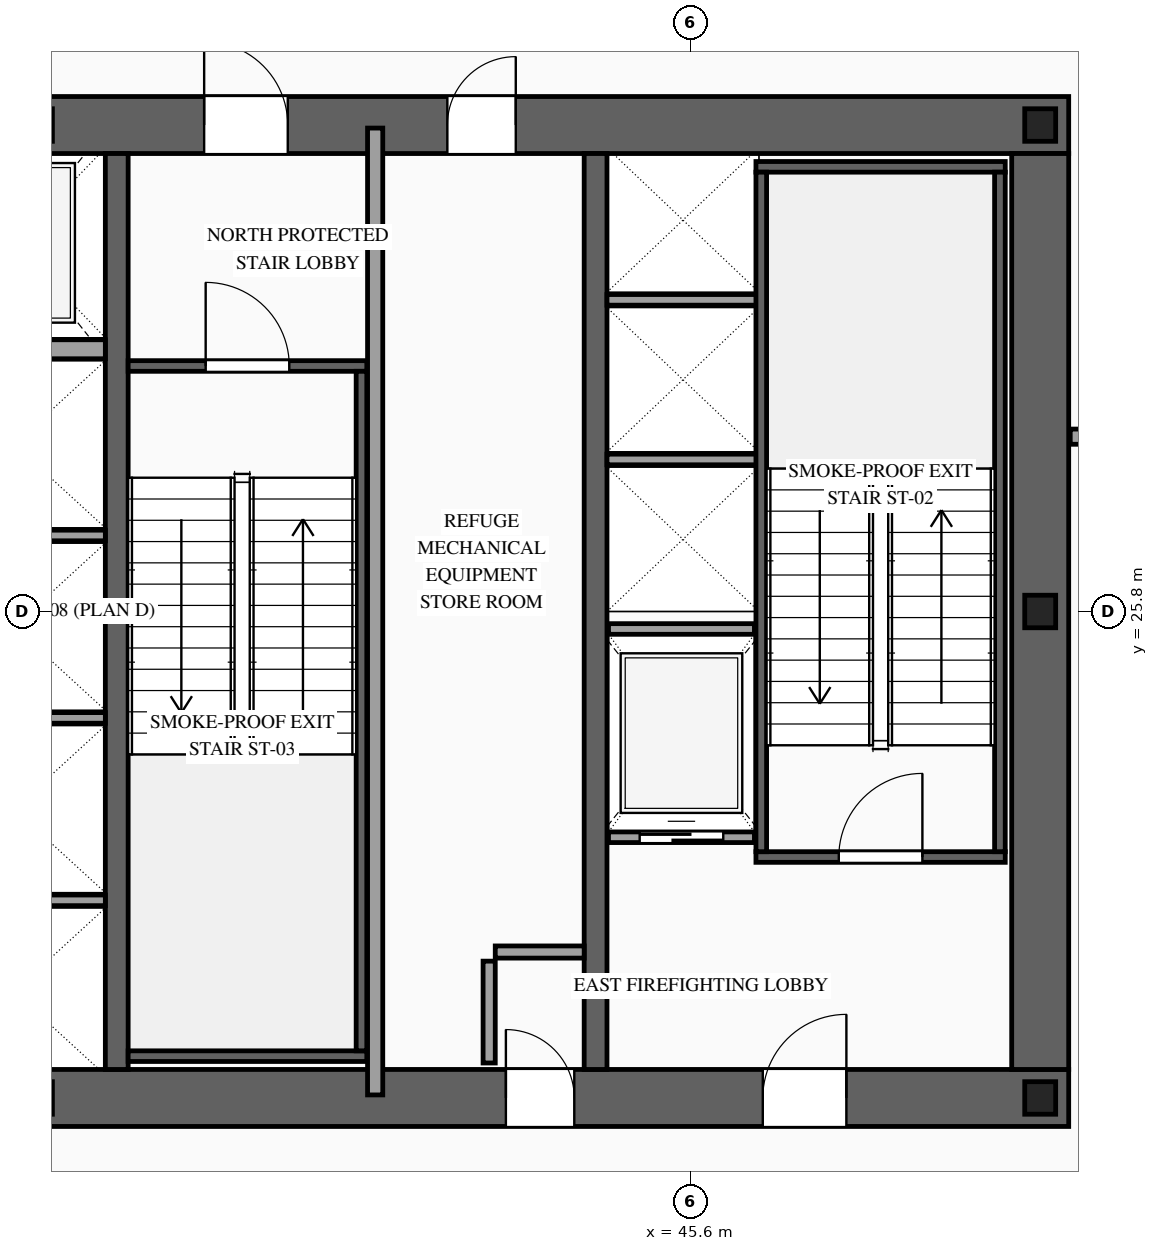
"""IFC4 building model, lengths in metres.
Left out: names, types, materials, properties, quantities, classifications, styles, units other than length and angle.
Written with IfcOpenShell. Run it as: python <this file> out.ifc"""

import sys

from ifc_helpers import new_model, si_unit, direction, frame, frame_2d, origin, origin_2d, place, context, subcontext, project, spatial, rectangle, i_section, extrude, source, transform, mapped, element, fill, save


model = new_model("IFC4")
c1 = context("Model", 3, precision=1e-05, world=origin(), true_north=direction((0.0, 1.0)))
c2 = subcontext(c1, "Body", "Model", "MODEL_VIEW")
j1 = project(units=[si_unit("LENGTHUNIT", "METRE"), si_unit("PLANEANGLEUNIT", "RADIAN")], contexts=[c1])
p1 = place(None, origin())
s1 = spatial("IfcSite", under=j1, at=p1, CompositionType="ELEMENT")
p2 = place(p1, origin())
s2 = spatial("IfcBuilding", under=s1, at=p2, CompositionType="ELEMENT")
p3 = place(p2, frame((0.0, 0.0, 129.8)))
s3 = spatial("IfcBuildingStorey", under=s2, at=p3, CompositionType="ELEMENT", Elevation=129.8)
p4 = place(p3, frame((23.425, 19.4, 0.0), z_axis=(0.0, 0.0, 1.0), x_axis=(1.0, 0.0, 0.0)))
e1 = element("IfcWall", 1, at=p4, inside=s3, PredefinedType="SHEAR", context=c2, shape_type="SweptSolid", body=[
    extrude(rectangle(XDim=27.15, YDim=0.75, at=frame_2d((13.575, 0.0))), origin(), (0.0, 0.0, 1.0), 4.6),
])
p5 = place(p4, frame((2.025, 0.0, 0.0)))
e2 = element("IfcOpeningElement", 2, at=p5, cuts=e1, PredefinedType="OPENING", context=c2, shape_type="SweptSolid", body=[
    extrude(rectangle(XDim=1.1, YDim=2.2, at=frame_2d((0.55, 1.1))), frame((0.0, 0.39, 0.0), z_axis=(0.0, -1.0, 0.0), x_axis=(1.0, 0.0, 0.0)), (0.0, 0.0, 1.0), 0.78),
])
p6 = place(p4, frame((9.925, 0.0, 0.0)))
e3 = element("IfcOpeningElement", 3, at=p6, cuts=e1, PredefinedType="OPENING", context=c2, shape_type="SweptSolid", body=[
    extrude(rectangle(XDim=1.1, YDim=2.2, at=frame_2d((0.55, 1.1))), frame((0.0, 0.39, 0.0), z_axis=(0.0, -1.0, 0.0), x_axis=(1.0, 0.0, 0.0)), (0.0, 0.0, 1.0), 0.78),
])
p7 = place(p4, frame((23.125, 0.0, 0.0)))
e4 = element("IfcOpeningElement", 4, at=p7, cuts=e1, PredefinedType="OPENING", context=c2, shape_type="SweptSolid", body=[
    extrude(rectangle(XDim=1.1, YDim=2.2, at=frame_2d((0.55, 1.1))), frame((0.0, 0.39, 0.0), z_axis=(0.0, -1.0, 0.0), x_axis=(1.0, 0.0, 0.0)), (0.0, 0.0, 1.0), 0.78),
])
p8 = place(p4, frame((19.745, 0.0, 0.0)))
e5 = element("IfcOpeningElement", 5, at=p8, cuts=e1, PredefinedType="OPENING", context=c2, shape_type="SweptSolid", body=[
    extrude(rectangle(XDim=0.9, YDim=2.15, at=frame_2d((0.45, 1.075))), frame((0.0, 0.39, 0.0), z_axis=(0.0, -1.0, 0.0), x_axis=(1.0, 0.0, 0.0)), (0.0, 0.0, 1.0), 0.78),
])
p9 = place(p3, frame((23.425, 32.2, 0.0), z_axis=(0.0, 0.0, 1.0), x_axis=(1.0, 0.0, 0.0)))
e6 = element("IfcWall", 6, at=p9, inside=s3, PredefinedType="SHEAR", context=c2, shape_type="SweptSolid", body=[
    extrude(rectangle(XDim=27.15, YDim=0.75, at=frame_2d((13.575, 0.0))), origin(), (0.0, 0.0, 1.0), 4.6),
])
p10 = place(p9, frame((4.645, 0.0, 0.0)))
e7 = element("IfcOpeningElement", 7, at=p10, cuts=e6, PredefinedType="OPENING", context=c2, shape_type="SweptSolid", body=[
    extrude(rectangle(XDim=0.9, YDim=2.15, at=frame_2d((0.45, 1.075))), frame((0.0, 0.39, 0.0), z_axis=(0.0, -1.0, 0.0), x_axis=(1.0, 0.0, 0.0)), (0.0, 0.0, 1.0), 0.78),
])
p11 = place(p9, frame((9.925, 0.0, 0.0)))
e8 = element("IfcOpeningElement", 8, at=p11, cuts=e6, PredefinedType="OPENING", context=c2, shape_type="SweptSolid", body=[
    extrude(rectangle(XDim=1.1, YDim=2.2, at=frame_2d((0.55, 1.1))), frame((0.0, 0.39, 0.0), z_axis=(0.0, -1.0, 0.0), x_axis=(1.0, 0.0, 0.0)), (0.0, 0.0, 1.0), 0.78),
])
p12 = place(p9, frame((15.775, 0.0, 0.0)))
e9 = element("IfcOpeningElement", 9, at=p12, cuts=e6, PredefinedType="OPENING", context=c2, shape_type="SweptSolid", body=[
    extrude(rectangle(XDim=1.1, YDim=2.2, at=frame_2d((0.55, 1.1))), frame((0.0, 0.39, 0.0), z_axis=(0.0, -1.0, 0.0), x_axis=(1.0, 0.0, 0.0)), (0.0, 0.0, 1.0), 0.78),
])
p13 = place(p9, frame((18.975, 0.0, 0.0)))
e10 = element("IfcOpeningElement", 10, at=p13, cuts=e6, PredefinedType="OPENING", context=c2, shape_type="SweptSolid", body=[
    extrude(rectangle(XDim=0.9, YDim=2.15, at=frame_2d((0.45, 1.075))), frame((0.0, 0.39, 0.0), z_axis=(0.0, -1.0, 0.0), x_axis=(1.0, 0.0, 0.0)), (0.0, 0.0, 1.0), 0.78),
])
m1 = source(origin(), c2, "Body", "SweptSolid", [
    extrude(rectangle(XDim=12.05, YDim=0.75, at=frame_2d((6.025, 0.0))), origin(), (0.0, 0.0, 1.0), 4.6),
])
p14 = place(p3, frame((50.2, 19.775, 0.0), z_axis=(0.0, 0.0, 1.0), x_axis=(0.0, 1.0, 0.0)))
e11 = element("IfcWall", 11, at=p14, inside=s3, PredefinedType="SHEAR", context=c2, shape_type="MappedRepresentation", body=[
    mapped(m1, transform((0.0, 0.0, 0.0), scale=1.0)),
])
m2 = source(origin(), c2, "Body", "SweptSolid", [
    extrude(rectangle(XDim=12.05, YDim=0.3, at=frame_2d((6.025, 0.0))), origin(), (0.0, 0.0, 1.0), 4.6),
])
for number, where, z_axis, x_axis in (
    (12, (38.05, 19.775, 0.0), (0.0, 0.0, 1.0), (0.0, 1.0, 0.0)),
    (13, (44.35, 19.775, 0.0), (0.0, 0.0, 1.0), (0.0, 1.0, 0.0)),
):
    element("IfcWall", number, at=place(p3, frame(where, z_axis=z_axis, x_axis=x_axis)), inside=s3, PredefinedType="SOLIDWALL", context=c2, shape_type="MappedRepresentation", body=[
        mapped(m2, transform((0.0, 0.0, 0.0), scale=1.0)),
    ])
m3 = source(origin(), c2, "Body", "SweptSolid", [
    extrude(i_section(OverallWidth=0.407, OverallDepth=0.428, WebThickness=0.02, FlangeThickness=0.035, at=origin_2d()), origin(), (0.0, 0.0, 1.0), 4.6),
])
for number, where, z_axis, x_axis in (
    (14, (37.0, 19.4, 0.0), (0.0, 0.0, 1.0), (1.0, 0.0, 0.0)),
    (15, (50.2, 19.4, 0.0), (0.0, 0.0, 1.0), (1.0, 0.0, 0.0)),
    (16, (50.2, 25.8, 0.0), (0.0, 0.0, 1.0), (1.0, 0.0, 0.0)),
    (17, (37.0, 32.2, 0.0), (0.0, 0.0, 1.0), (1.0, 0.0, 0.0)),
    (18, (50.2, 32.2, 0.0), (0.0, 0.0, 1.0), (1.0, 0.0, 0.0)),
):
    element("IfcColumn", number, at=place(p3, frame(where, z_axis=z_axis, x_axis=x_axis)), inside=s3, PredefinedType="COLUMN", context=c2, shape_type="MappedRepresentation", body=[
        mapped(m3, transform((0.0, 0.0, 0.0), scale=1.0)),
    ])
p15 = place(p3, frame((44.52, 22.83, 0.0), z_axis=(0.0, 0.0, 1.0), x_axis=(1.0, 0.0, 0.0)))
e19 = element("IfcWall", 19, at=p15, inside=s3, PredefinedType="SOLIDWALL", context=c2, shape_type="SweptSolid", body=[
    extrude(rectangle(XDim=1.92, YDim=0.14, at=frame_2d((0.96, 0.0))), origin(), (0.0, 0.0, 1.0), 4.38),
])
p16 = place(p15, frame((0.41, 0.0, 0.0)))
e20 = element("IfcOpeningElement", 20, at=p16, cuts=e19, PredefinedType="OPENING", context=c2, shape_type="SweptSolid", body=[
    extrude(rectangle(XDim=1.1, YDim=2.2, at=frame_2d((0.55, 1.1))), frame((0.0, 0.085, 0.0), z_axis=(0.0, -1.0, 0.0), x_axis=(1.0, 0.0, 0.0)), (0.0, 0.0, 1.0), 0.17),
])
m4 = source(origin(), c2, "Body", "SweptSolid", [
    extrude(rectangle(XDim=1.92, YDim=0.14, at=frame_2d((0.96, 0.0))), origin(), (0.0, 0.0, 1.0), 4.38),
])
p17 = place(p3, frame((44.52, 25.57, 0.0), z_axis=(0.0, 0.0, 1.0), x_axis=(1.0, 0.0, 0.0)))
e21 = element("IfcWall", 21, at=p17, inside=s3, PredefinedType="SOLIDWALL", context=c2, shape_type="MappedRepresentation", body=[
    mapped(m4, transform((0.0, 0.0, 0.0), scale=1.0)),
])
m5 = source(origin(), c2, "Body", "SweptSolid", [
    extrude(rectangle(XDim=2.4, YDim=0.14, at=frame_2d((1.2, 0.0))), origin(), (0.0, 0.0, 1.0), 4.38),
])
for number, where, z_axis, x_axis in (
    (22, (35.5, 22.0, 0.0), (0.0, 0.0, 1.0), (1.0, 0.0, 0.0)),
    (23, (35.5, 24.4, 0.0), (0.0, 0.0, 1.0), (1.0, 0.0, 0.0)),
    (24, (35.5, 26.8, 0.0), (0.0, 0.0, 1.0), (1.0, 0.0, 0.0)),
):
    element("IfcWall", number, at=place(p3, frame(where, z_axis=z_axis, x_axis=x_axis)), inside=s3, PredefinedType="SOLIDWALL", context=c2, shape_type="MappedRepresentation", body=[
        mapped(m5, transform((0.0, 0.0, 0.0), scale=1.0)),
    ])
m6 = source(origin(), c2, "Body", "SweptSolid", [
    extrude(rectangle(XDim=2.4, YDim=0.25, at=frame_2d((1.2, 0.0))), origin(), (0.0, 0.0, 1.0), 4.38),
])
p18 = place(p3, frame((35.5, 29.25, 0.0), z_axis=(0.0, 0.0, 1.0), x_axis=(1.0, 0.0, 0.0)))
e25 = element("IfcWall", 25, at=p18, inside=s3, PredefinedType="SOLIDWALL", context=c2, shape_type="MappedRepresentation", body=[
    mapped(m6, transform((0.0, 0.0, 0.0), scale=1.0)),
])
m7 = source(origin(), c2, "Body", "SweptSolid", [
    extrude(rectangle(XDim=2.0, YDim=0.14, at=frame_2d((1.0, 0.0))), origin(), (0.0, 0.0, 1.0), 4.38),
])
for number, where, z_axis, x_axis in (
    (26, (44.5, 27.8, 0.0), (0.0, 0.0, 1.0), (1.0, 0.0, 0.0)),
    (27, (44.5, 29.9, 0.0), (0.0, 0.0, 1.0), (1.0, 0.0, 0.0)),
):
    element("IfcWall", number, at=place(p3, frame(where, z_axis=z_axis, x_axis=x_axis)), inside=s3, PredefinedType="SOLIDWALL", context=c2, shape_type="MappedRepresentation", body=[
        mapped(m7, transform((0.0, 0.0, 0.0), scale=1.0)),
    ])
p19 = place(p3, frame((46.46, 22.57, 0.0), z_axis=(0.0, 0.0, 1.0), x_axis=(1.0, 0.0, 0.0)))
e28 = element("IfcWall", 28, at=p19, inside=s3, PredefinedType="SOLIDWALL", context=c2, shape_type="SweptSolid", body=[
    extrude(rectangle(XDim=3.28, YDim=0.14, at=frame_2d((1.64, 0.0))), origin(), (0.0, 0.0, 1.0), 4.38),
])
p20 = place(p19, frame((1.09, 0.0, 0.0)))
e29 = element("IfcOpeningElement", 29, at=p20, cuts=e28, PredefinedType="OPENING", context=c2, shape_type="SweptSolid", body=[
    extrude(rectangle(XDim=1.1, YDim=2.2, at=frame_2d((0.55, 1.1))), frame((0.0, 0.085, 0.0), z_axis=(0.0, -1.0, 0.0), x_axis=(1.0, 0.0, 0.0)), (0.0, 0.0, 1.0), 0.17),
])
m8 = source(origin(), c2, "Body", "SweptSolid", [
    extrude(rectangle(XDim=3.28, YDim=0.14, at=frame_2d((1.64, 0.0))), origin(), (0.0, 0.0, 1.0), 4.38),
])
p21 = place(p3, frame((46.46, 31.65, 0.0), z_axis=(0.0, 0.0, 1.0), x_axis=(1.0, 0.0, 0.0)))
e30 = element("IfcWall", 30, at=p21, inside=s3, PredefinedType="SOLIDWALL", context=c2, shape_type="MappedRepresentation", body=[
    mapped(m8, transform((0.0, 0.0, 0.0), scale=1.0)),
])
m9 = source(origin(), c2, "Body", "SweptSolid", [
    extrude(rectangle(XDim=8.94, YDim=0.14, at=frame_2d((4.47, 0.0))), origin(), (0.0, 0.0, 1.0), 4.38),
])
for number, where, z_axis, x_axis in (
    (31, (46.53, 22.64, 0.0), (0.0, 0.0, 1.0), (0.0, 1.0, 0.0)),
    (32, (49.67, 22.64, 0.0), (0.0, 0.0, 1.0), (0.0, 1.0, 0.0)),
):
    element("IfcWall", number, at=place(p3, frame(where, z_axis=z_axis, x_axis=x_axis)), inside=s3, PredefinedType="SOLIDWALL", context=c2, shape_type="MappedRepresentation", body=[
        mapped(m9, transform((0.0, 0.0, 0.0), scale=1.0)),
    ])
p22 = place(p3, frame((38.2, 29.03, 0.0), z_axis=(0.0, 0.0, 1.0), x_axis=(1.0, 0.0, 0.0)))
e33 = element("IfcWall", 33, at=p22, inside=s3, PredefinedType="SOLIDWALL", context=c2, shape_type="SweptSolid", body=[
    extrude(rectangle(XDim=3.14, YDim=0.14, at=frame_2d((1.57, 0.0))), origin(), (0.0, 0.0, 1.0), 4.38),
])
p23 = place(p22, frame((1.02, 0.0, 0.0)))
e34 = element("IfcOpeningElement", 34, at=p23, cuts=e33, PredefinedType="OPENING", context=c2, shape_type="SweptSolid", body=[
    extrude(rectangle(XDim=1.1, YDim=2.2, at=frame_2d((0.55, 1.1))), frame((0.0, 0.085, 0.0), z_axis=(0.0, -1.0, 0.0), x_axis=(1.0, 0.0, 0.0)), (0.0, 0.0, 1.0), 0.17),
])
m10 = source(origin(), c2, "Body", "SweptSolid", [
    extrude(rectangle(XDim=3.14, YDim=0.14, at=frame_2d((1.57, 0.0))), origin(), (0.0, 0.0, 1.0), 4.38),
])
p24 = place(p3, frame((38.2, 19.95, 0.0), z_axis=(0.0, 0.0, 1.0), x_axis=(1.0, 0.0, 0.0)))
e35 = element("IfcWall", 35, at=p24, inside=s3, PredefinedType="SOLIDWALL", context=c2, shape_type="MappedRepresentation", body=[
    mapped(m10, transform((0.0, 0.0, 0.0), scale=1.0)),
])
m11 = source(origin(), c2, "Body", "SweptSolid", [
    extrude(rectangle(XDim=8.94, YDim=0.14, at=frame_2d((4.47, 0.0))), origin(), (0.0, 0.0, 1.0), 4.38),
])
p25 = place(p3, frame((41.27, 20.02, 0.0), z_axis=(0.0, 0.0, 1.0), x_axis=(0.0, 1.0, 0.0)))
e36 = element("IfcWall", 36, at=p25, inside=s3, PredefinedType="SOLIDWALL", context=c2, shape_type="MappedRepresentation", body=[
    mapped(m11, transform((0.0, 0.0, 0.0), scale=1.0)),
])
m12 = source(origin(), c2, "Body", "SweptSolid", [
    extrude(rectangle(XDim=1.34, YDim=0.16, at=frame_2d((0.67, 0.0))), origin(), (0.0, 0.0, 1.0), 4.38),
])
p26 = place(p3, frame((42.95, 19.86, 0.0), z_axis=(0.0, 0.0, 1.0), x_axis=(0.0, 1.0, 0.0)))
e37 = element("IfcWall", 37, at=p26, inside=s3, PredefinedType="PARTITIONING", context=c2, shape_type="MappedRepresentation", body=[
    mapped(m12, transform((0.0, 0.0, 0.0), scale=1.0)),
])
m13 = source(origin(), c2, "Body", "SweptSolid", [
    extrude(rectangle(XDim=1.17, YDim=0.16, at=frame_2d((0.585, 0.0))), origin(), (0.0, 0.0, 1.0), 4.38),
])
p27 = place(p3, frame((43.03, 21.32, 0.0), z_axis=(0.0, 0.0, 1.0), x_axis=(1.0, 0.0, 0.0)))
e38 = element("IfcWall", 38, at=p27, inside=s3, PredefinedType="PARTITIONING", context=c2, shape_type="MappedRepresentation", body=[
    mapped(m13, transform((0.0, 0.0, 0.0), scale=1.0)),
])
m14 = source(origin(), c2, "Body", "SweptSolid", [
    extrude(rectangle(XDim=12.72, YDim=0.2, at=frame_2d((6.36, 0.0))), origin(), (0.0, 0.0, 1.0), 4.38),
])
p28 = place(p3, frame((41.45, 19.44, 0.0), z_axis=(0.0, 0.0, 1.0), x_axis=(0.0, 1.0, 0.0)))
e39 = element("IfcWall", 39, at=p28, inside=s3, PredefinedType="PARTITIONING", context=c2, shape_type="MappedRepresentation", body=[
    mapped(m14, transform((0.0, 0.0, 0.0), scale=1.0)),
])
m15 = source(origin(), c2, "Body", "SweptSolid", [
    extrude(rectangle(XDim=1.455, YDim=0.2, at=frame_2d((0.728, 0.0))), origin(), (0.0, 0.0, 1.0), 4.38),
])
p29 = place(p3, frame((50.595, 28.1, 0.0), z_axis=(0.0, 0.0, 1.0), x_axis=(1.0, 0.0, 0.0)))
e40 = element("IfcWall", 40, at=p29, inside=s3, PredefinedType="PARTITIONING", context=c2, shape_type="MappedRepresentation", body=[
    mapped(m15, transform((0.0, 0.0, 0.0), scale=1.0)),
])
m16 = source(origin(), c2, "Body", "SweptSolid", [
    extrude(rectangle(XDim=1.1, YDim=2.2, at=frame_2d((0.55, 1.1))), frame((0.0, 0.025, 0.0), z_axis=(0.0, -1.0, 0.0), x_axis=(1.0, 0.0, 0.0)), (0.0, 0.0, 1.0), 0.05),
])
p30 = place(p16, origin())
e41 = element("IfcDoor", 41, at=p30, inside=s3, OperationType="SLIDING_TO_RIGHT", PredefinedType="DOOR", context=c2, shape_type="MappedRepresentation", body=[
    mapped(m16, transform((0.0, 0.0, 0.0), scale=1.0)),
])
fill(e20, e41)
m17 = source(origin(), c2, "Body", "SweptSolid", [
    extrude(rectangle(XDim=1.1, YDim=2.2, at=frame_2d((0.55, 1.1))), frame((0.0, 0.025, 0.0), z_axis=(0.0, -1.0, 0.0), x_axis=(1.0, 0.0, 0.0)), (0.0, 0.0, 1.0), 0.05),
])
p31 = place(p20, origin())
e42 = element("IfcDoor", 42, at=p31, inside=s3, OperationType="SINGLE_SWING_RIGHT", PredefinedType="DOOR", context=c2, shape_type="MappedRepresentation", body=[
    mapped(m17, transform((0.0, 0.0, 0.0), scale=1.0)),
])
fill(e29, e42)
p32 = place(p23, origin())
e43 = element("IfcDoor", 43, at=p32, inside=s3, OperationType="SINGLE_SWING_LEFT", PredefinedType="DOOR", context=c2, shape_type="MappedRepresentation", body=[
    mapped(m17, transform((0.0, 0.0, 0.0), scale=1.0)),
])
fill(e34, e43)
p33 = place(p7, origin())
e44 = element("IfcDoor", 44, at=p33, inside=s3, OperationType="SINGLE_SWING_RIGHT", PredefinedType="DOOR", context=c2, shape_type="MappedRepresentation", body=[
    mapped(m17, transform((0.0, 0.0, 0.0), scale=1.0)),
])
fill(e4, e44)
p34 = place(p12, origin())
e45 = element("IfcDoor", 45, at=p34, inside=s3, OperationType="SINGLE_SWING_LEFT", PredefinedType="DOOR", context=c2, shape_type="MappedRepresentation", body=[
    mapped(m17, transform((0.0, 0.0, 0.0), scale=1.0)),
])
fill(e9, e45)
m18 = source(origin(), c2, "Body", "SweptSolid", [
    extrude(rectangle(XDim=0.9, YDim=2.15, at=frame_2d((0.45, 1.075))), frame((0.0, 0.025, 0.0), z_axis=(0.0, -1.0, 0.0), x_axis=(1.0, 0.0, 0.0)), (0.0, 0.0, 1.0), 0.05),
])
p35 = place(p8, origin())
e46 = element("IfcDoor", 46, at=p35, inside=s3, OperationType="SINGLE_SWING_LEFT", PredefinedType="DOOR", context=c2, shape_type="MappedRepresentation", body=[
    mapped(m18, transform((0.0, 0.0, 0.0), scale=1.0)),
])
fill(e5, e46)
p36 = place(p13, origin())
e47 = element("IfcDoor", 47, at=p36, inside=s3, OperationType="SINGLE_SWING_RIGHT", PredefinedType="DOOR", context=c2, shape_type="MappedRepresentation", body=[
    mapped(m18, transform((0.0, 0.0, 0.0), scale=1.0)),
])
fill(e10, e47)
save(model, sys.argv[1])
